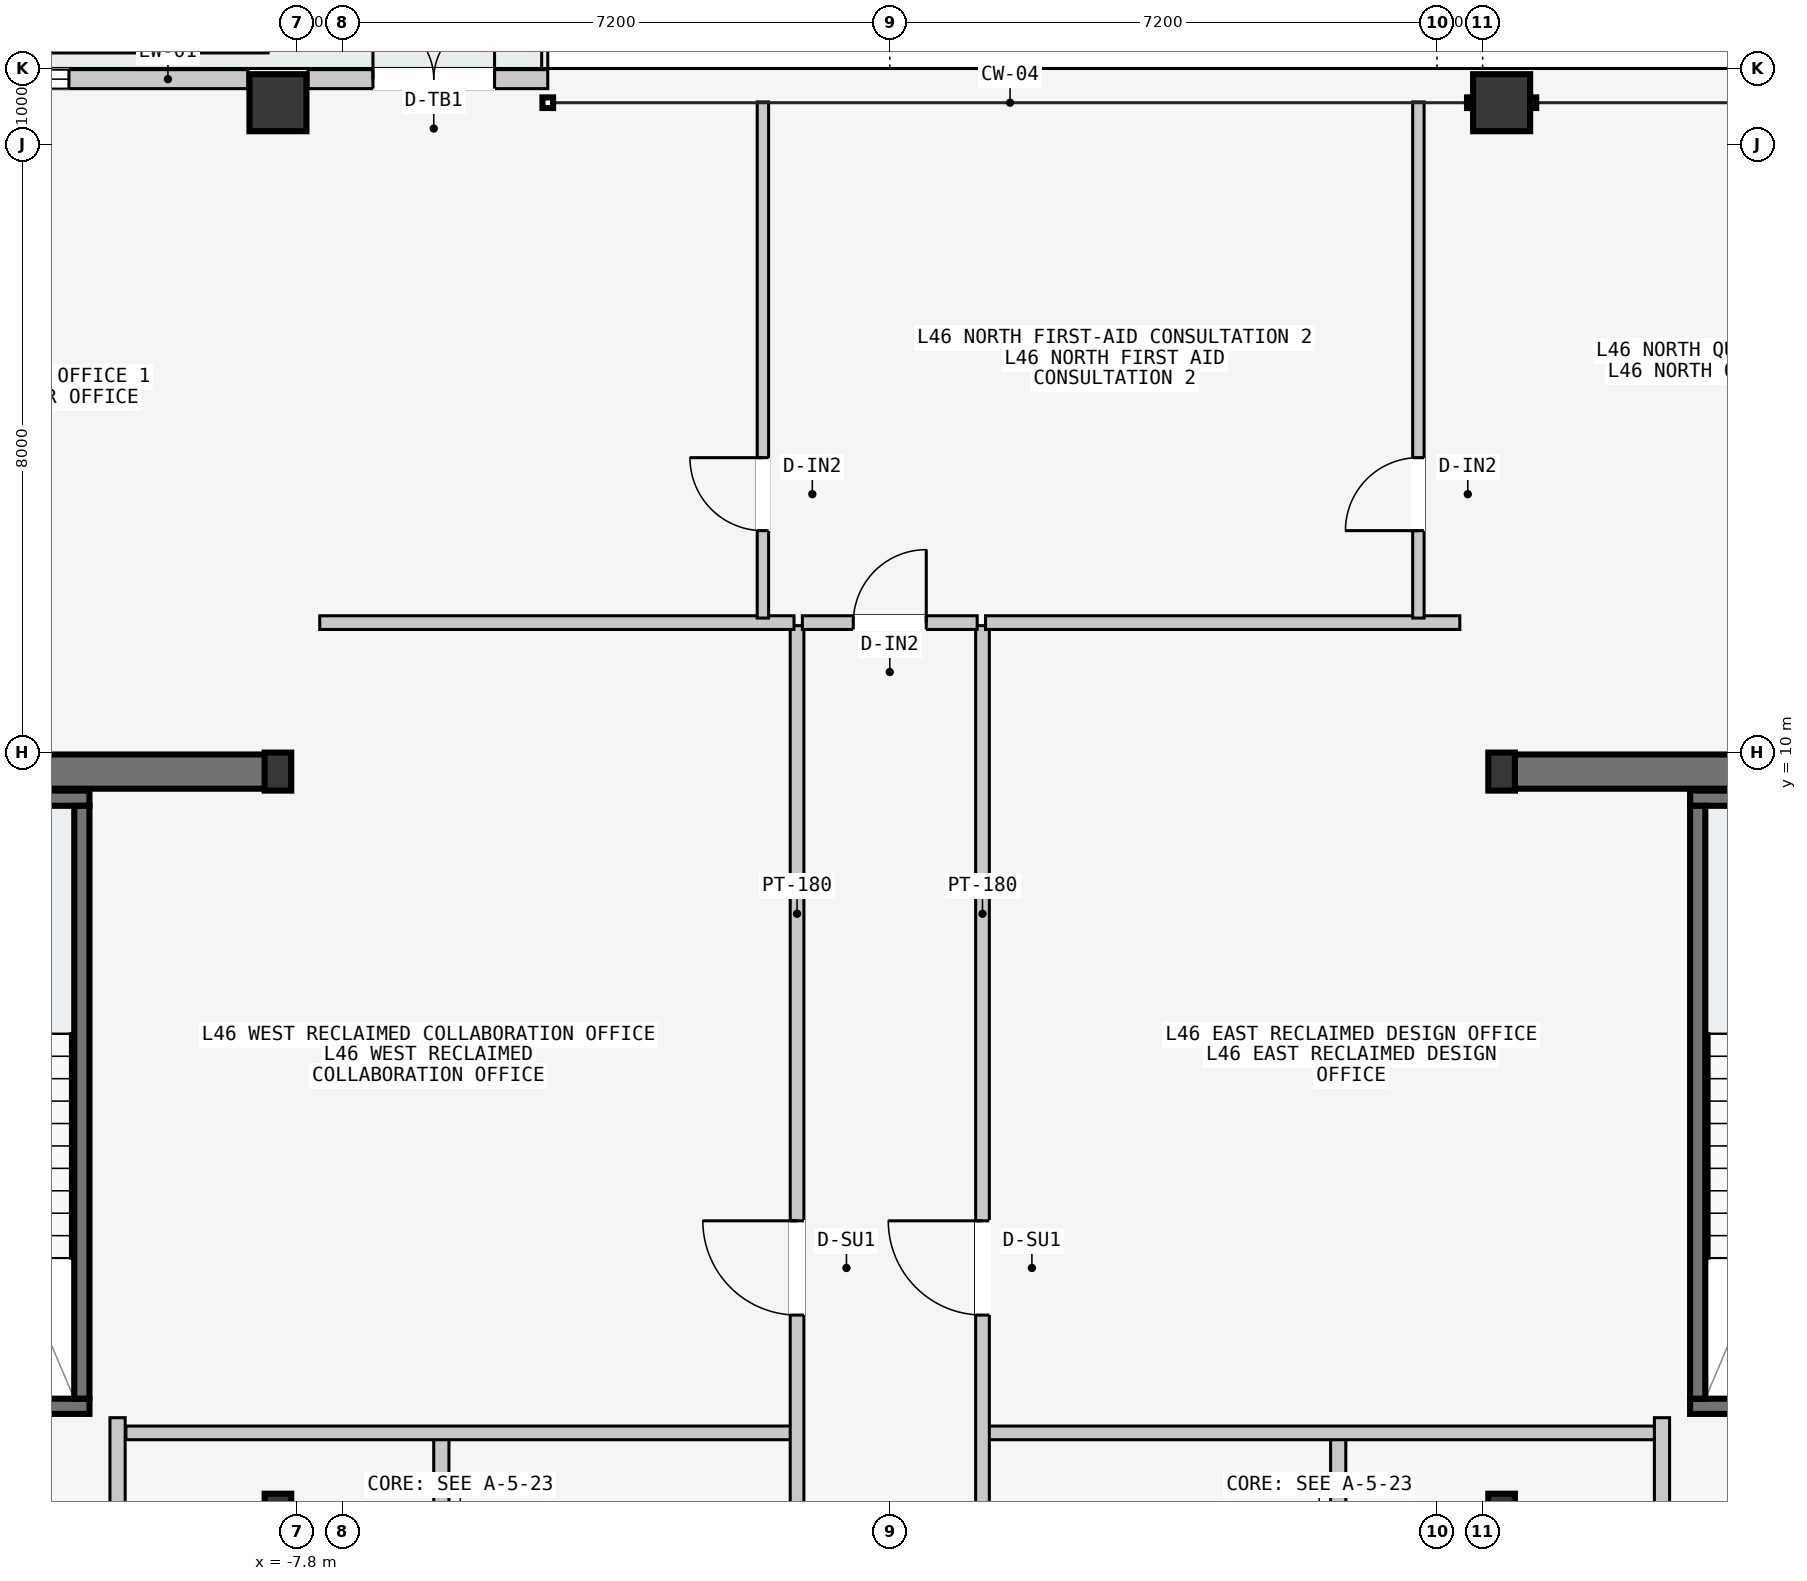
"""IFC4 building model, lengths in metres.
Left out: names, types, materials, properties, quantities, classifications, styles, units other than length and angle.
Written with IfcOpenShell. Run it as: python <this file> out.ifc"""

import sys

from ifc_helpers import new_model, si_unit, direction, frame, frame_2d, origin, origin_2d, place, context, subcontext, project, spatial, rectangle, hollow_rectangle, i_section, extrude, element, fill, save


model = new_model("IFC4")
c1 = context("Model", 3, precision=1e-05, world=origin(), true_north=direction((0.0, 1.0)))
c2 = subcontext(c1, "Body", "Model", "MODEL_VIEW")
j1 = project(units=[si_unit("LENGTHUNIT", "METRE"), si_unit("PLANEANGLEUNIT", "RADIAN")], contexts=[c1])
p1 = place(None, origin())
s1 = spatial("IfcSite", under=j1, at=p1, CompositionType="ELEMENT")
p2 = place(p1, origin())
s2 = spatial("IfcBuilding", under=s1, at=p2, CompositionType="ELEMENT")
p3 = place(p2, frame((0.0, 0.0, 176.7)))
s3 = spatial("IfcBuildingStorey", under=s2, at=p3, CompositionType="ELEMENT", Elevation=176.7)
for number, where, z_axis, x_axis in (
    (1, (-14.53, 9.75, -0.2), (0.0, 0.0, 1.0), (1.0, 0.0, 0.0)),
    (2, (8.07, 9.75, -0.2), (0.0, 0.0, 1.0), (1.0, 0.0, 0.0)),
):
    element("IfcWall", number, at=place(p3, frame(where, z_axis=z_axis, x_axis=x_axis)), inside=s3, PredefinedType="SHEAR", context=c2, shape_type="SweptSolid", body=[
        extrude(rectangle(XDim=6.46, YDim=0.45, at=frame_2d((3.23, 0.0))), origin(), (0.0, 0.0, 1.0), 3.6),
    ])
p4 = place(p3, frame((-14.25, 1.4, -0.2), z_axis=(0.0, 0.0, 1.0), x_axis=(1.0, 0.0, 0.0)))
e3 = element("IfcWall", 3, at=p4, inside=s3, PredefinedType="SOLIDWALL", context=c2, shape_type="SweptSolid", body=[
    extrude(rectangle(XDim=3.72, YDim=0.2, at=frame_2d((1.86, 0.0))), origin(), (0.0, 0.0, 1.0), 3.6),
])
p5 = place(p4, frame((1.5, 0.0, 0.2)))
e4 = element("IfcOpeningElement", 4, at=p5, cuts=e3, PredefinedType="OPENING", context=c2, shape_type="SweptSolid", body=[
    extrude(rectangle(XDim=1.12, YDim=2.18, at=frame_2d((0.56, 1.09))), frame((0.0, 0.11, 0.0), z_axis=(0.0, -1.0, 0.0), x_axis=(1.0, 0.0, 0.0)), (0.0, 0.0, 1.0), 0.22),
])
p6 = place(p3, frame((-14.25, 9.4, -0.2), z_axis=(0.0, 0.0, 1.0), x_axis=(1.0, 0.0, 0.0)))
e5 = element("IfcWall", 5, at=p6, inside=s3, PredefinedType="SOLIDWALL", context=c2, shape_type="SweptSolid", body=[
    extrude(rectangle(XDim=3.72, YDim=0.2, at=frame_2d((1.86, 0.0))), origin(), (0.0, 0.0, 1.0), 3.6),
])
p7 = place(p3, frame((-10.63, 1.5, -0.2), z_axis=(0.0, 0.0, 1.0), x_axis=(0.0, 1.0, 0.0)))
e6 = element("IfcWall", 6, at=p7, inside=s3, PredefinedType="SOLIDWALL", context=c2, shape_type="SweptSolid", body=[
    extrude(rectangle(XDim=7.8, YDim=0.2, at=frame_2d((3.9, 0.0))), origin(), (0.0, 0.0, 1.0), 3.6),
])
p8 = place(p3, frame((10.53, 1.4, -0.2), z_axis=(0.0, 0.0, 1.0), x_axis=(1.0, 0.0, 0.0)))
e7 = element("IfcWall", 7, at=p8, inside=s3, PredefinedType="SOLIDWALL", context=c2, shape_type="SweptSolid", body=[
    extrude(rectangle(XDim=3.72, YDim=0.2, at=frame_2d((1.86, 0.0))), origin(), (0.0, 0.0, 1.0), 3.6),
])
p9 = place(p8, frame((1.5, 0.0, 0.2)))
e8 = element("IfcOpeningElement", 8, at=p9, cuts=e7, PredefinedType="OPENING", context=c2, shape_type="SweptSolid", body=[
    extrude(rectangle(XDim=1.12, YDim=2.18, at=frame_2d((0.56, 1.09))), frame((0.0, 0.11, 0.0), z_axis=(0.0, -1.0, 0.0), x_axis=(1.0, 0.0, 0.0)), (0.0, 0.0, 1.0), 0.22),
])
p10 = place(p3, frame((10.53, 9.4, -0.2), z_axis=(0.0, 0.0, 1.0), x_axis=(1.0, 0.0, 0.0)))
e9 = element("IfcWall", 9, at=p10, inside=s3, PredefinedType="SOLIDWALL", context=c2, shape_type="SweptSolid", body=[
    extrude(rectangle(XDim=3.72, YDim=0.2, at=frame_2d((1.86, 0.0))), origin(), (0.0, 0.0, 1.0), 3.6),
])
p11 = place(p3, frame((10.63, 1.5, -0.2), z_axis=(0.0, 0.0, 1.0), x_axis=(0.0, 1.0, 0.0)))
e10 = element("IfcWall", 10, at=p11, inside=s3, PredefinedType="SOLIDWALL", context=c2, shape_type="SweptSolid", body=[
    extrude(rectangle(XDim=7.8, YDim=0.2, at=frame_2d((3.9, 0.0))), origin(), (0.0, 0.0, 1.0), 3.6),
])
for number, where, z_axis, x_axis in (
    (11, (-8.05, 0.0, 0.0), (0.0, 0.0, 1.0), (1.0, 0.0, 0.0)),
    (12, (-8.05, 9.75, 0.0), (0.0, 0.0, 1.0), (1.0, 0.0, 0.0)),
    (13, (8.05, 0.0, 0.0), (0.0, 0.0, 1.0), (1.0, 0.0, 0.0)),
    (14, (8.05, 9.75, 0.0), (0.0, 0.0, 1.0), (1.0, 0.0, 0.0)),
):
    element("IfcColumn", number, at=place(p3, frame(where, z_axis=z_axis, x_axis=x_axis)), inside=s3, PredefinedType="COLUMN", context=c2, shape_type="SweptSolid", body=[
        extrude(i_section(OverallWidth=0.35, OverallDepth=0.5, WebThickness=0.02, FlangeThickness=0.032, at=origin_2d()), origin(), (0.0, 0.0, 1.0), 3.6),
    ])
for number, where, z_axis, x_axis in (
    (15, (-8.05, 18.55, 0.0), (0.0, 0.0, 1.0), (1.0, 0.0, 0.0)),
    (16, (8.05, 18.55, 0.0), (0.0, 0.0, 1.0), (1.0, 0.0, 0.0)),
):
    element("IfcColumn", number, at=place(p3, frame(where, z_axis=z_axis, x_axis=x_axis)), inside=s3, PredefinedType="COLUMN", context=c2, shape_type="SweptSolid", body=[
        extrude(hollow_rectangle(XDim=0.75, YDim=0.75, WallThickness=0.032, at=origin_2d()), origin(), (0.0, 0.0, 1.0), 3.6),
    ])
p12 = place(p3, frame((-14.655, 18.86, 0.0), z_axis=(0.0, 0.0, 1.0), x_axis=(1.0, 0.0, 0.0)))
e17 = element("IfcWall", 17, at=p12, inside=s3, PredefinedType="STANDARD", context=c2, shape_type="SweptSolid", body=[
    extrude(rectangle(XDim=6.21, YDim=0.25, at=frame_2d((3.105, 0.0))), origin(), (0.0, 0.0, 1.0), 3.4),
])
p13 = place(p12, frame((1.855, 0.0, 0.85)))
e18 = element("IfcOpeningElement", 18, at=p13, cuts=e17, PredefinedType="OPENING", context=c2, shape_type="SweptSolid", body=[
    extrude(rectangle(XDim=2.0, YDim=2.1, at=frame_2d((1.0, 1.05))), frame((0.0, 0.135, 0.0), z_axis=(0.0, -1.0, 0.0), x_axis=(1.0, 0.0, 0.0)), (0.0, 0.0, 1.0), 0.27),
])
p14 = place(p3, frame((-7.655, 18.86, 0.0), z_axis=(0.0, 0.0, 1.0), x_axis=(1.0, 0.0, 0.0)))
e19 = element("IfcWall", 19, at=p14, inside=s3, PredefinedType="STANDARD", context=c2, shape_type="SweptSolid", body=[
    extrude(rectangle(XDim=3.155, YDim=0.25, at=frame_2d((1.578, 0.0))), origin(), (0.0, 0.0, 1.0), 3.4),
])
p15 = place(p14, frame((0.855, 0.0, 0.0)))
e20 = element("IfcOpeningElement", 20, at=p15, cuts=e19, PredefinedType="OPENING", context=c2, shape_type="SweptSolid", body=[
    extrude(rectangle(XDim=1.6, YDim=2.2, at=frame_2d((0.8, 1.1))), frame((0.0, 0.135, 0.0), z_axis=(0.0, -1.0, 0.0), x_axis=(1.0, 0.0, 0.0)), (0.0, 0.0, 1.0), 0.27),
])
p16 = place(p3, frame((-5.9, -9.45, 0.0), z_axis=(0.0, 0.0, 1.0), x_axis=(0.0, 1.0, 0.0)))
e21 = element("IfcWall", 21, at=p16, inside=s3, PredefinedType="PARTITIONING", context=c2, shape_type="SweptSolid", body=[
    extrude(rectangle(XDim=10.5, YDim=0.2, at=frame_2d((5.25, 0.0))), origin(), (0.0, 0.0, 1.0), 3.4),
])
p17 = place(p16, frame((3.9, 0.0, 0.0)))
e22 = element("IfcOpeningElement", 22, at=p17, cuts=e21, PredefinedType="OPENING", context=c2, shape_type="SweptSolid", body=[
    extrude(rectangle(XDim=1.5, YDim=2.2, at=frame_2d((0.75, 1.1))), frame((0.0, 0.11, 0.0), z_axis=(0.0, -1.0, 0.0), x_axis=(1.0, 0.0, 0.0)), (0.0, 0.0, 1.0), 0.22),
])
p18 = place(p3, frame((-10.16, -2.55, 0.0), z_axis=(0.0, 0.0, 1.0), x_axis=(0.0, 1.0, 0.0)))
e23 = element("IfcWall", 23, at=p18, inside=s3, PredefinedType="PARTITIONING", context=c2, shape_type="SweptSolid", body=[
    extrude(rectangle(XDim=3.8, YDim=0.2, at=frame_2d((1.9, 0.0))), origin(), (0.0, 0.0, 1.0), 3.4),
])
p19 = place(p18, frame((1.3, 0.0, 0.0)))
e24 = element("IfcOpeningElement", 24, at=p19, cuts=e23, PredefinedType="OPENING", context=c2, shape_type="SweptSolid", body=[
    extrude(rectangle(XDim=1.1, YDim=2.15, at=frame_2d((0.55, 1.075))), frame((0.0, 0.11, 0.0), z_axis=(0.0, -1.0, 0.0), x_axis=(1.0, 0.0, 0.0)), (0.0, 0.0, 1.0), 0.22),
])
p20 = place(p3, frame((5.9, -9.45, 0.0), z_axis=(0.0, 0.0, 1.0), x_axis=(0.0, 1.0, 0.0)))
e25 = element("IfcWall", 25, at=p20, inside=s3, PredefinedType="PARTITIONING", context=c2, shape_type="SweptSolid", body=[
    extrude(rectangle(XDim=10.5, YDim=0.2, at=frame_2d((5.25, 0.0))), origin(), (0.0, 0.0, 1.0), 3.4),
])
p21 = place(p20, frame((3.9, 0.0, 0.0)))
e26 = element("IfcOpeningElement", 26, at=p21, cuts=e25, PredefinedType="OPENING", context=c2, shape_type="SweptSolid", body=[
    extrude(rectangle(XDim=1.5, YDim=2.2, at=frame_2d((0.75, 1.1))), frame((0.0, 0.11, 0.0), z_axis=(0.0, -1.0, 0.0), x_axis=(1.0, 0.0, 0.0)), (0.0, 0.0, 1.0), 0.22),
])
p22 = place(p3, frame((10.16, -2.55, 0.0), z_axis=(0.0, 0.0, 1.0), x_axis=(0.0, 1.0, 0.0)))
e27 = element("IfcWall", 27, at=p22, inside=s3, PredefinedType="PARTITIONING", context=c2, shape_type="SweptSolid", body=[
    extrude(rectangle(XDim=3.8, YDim=0.2, at=frame_2d((1.9, 0.0))), origin(), (0.0, 0.0, 1.0), 3.4),
])
p23 = place(p22, frame((1.3, 0.0, 0.0)))
e28 = element("IfcOpeningElement", 28, at=p23, cuts=e27, PredefinedType="OPENING", context=c2, shape_type="SweptSolid", body=[
    extrude(rectangle(XDim=1.1, YDim=2.15, at=frame_2d((0.55, 1.075))), frame((0.0, 0.11, 0.0), z_axis=(0.0, -1.0, 0.0), x_axis=(1.0, 0.0, 0.0)), (0.0, 0.0, 1.0), 0.22),
])
p24 = place(p3, frame((-10.05, 1.05, 0.0), z_axis=(0.0, 0.0, 1.0), x_axis=(1.0, 0.0, 0.0)))
e29 = element("IfcWall", 29, at=p24, inside=s3, PredefinedType="PARTITIONING", context=c2, shape_type="SweptSolid", body=[
    extrude(rectangle(XDim=8.79, YDim=0.18, at=frame_2d((4.395, 0.0))), origin(), (0.0, 0.0, 1.0), 3.4),
])
p25 = place(p3, frame((-1.22, -3.5, 0.0), z_axis=(0.0, 0.0, 1.0), x_axis=(0.0, 1.0, 0.0)))
e30 = element("IfcWall", 30, at=p25, inside=s3, PredefinedType="PARTITIONING", context=c2, shape_type="SweptSolid", body=[
    extrude(rectangle(XDim=15.17, YDim=0.18, at=frame_2d((7.585, 0.0))), origin(), (0.0, 0.0, 1.0), 3.4),
])
p26 = place(p25, frame((6.1, 0.0, 0.0)))
e31 = element("IfcOpeningElement", 31, at=p26, cuts=e30, PredefinedType="OPENING", context=c2, shape_type="SweptSolid", body=[
    extrude(rectangle(XDim=1.24, YDim=2.24, at=frame_2d((0.62, 1.12))), frame((0.0, 0.1, 0.0), z_axis=(0.0, -1.0, 0.0), x_axis=(1.0, 0.0, 0.0)), (0.0, 0.0, 1.0), 0.2),
])
p27 = place(p25, frame((1.6, 0.0, 0.0)))
e32 = element("IfcOpeningElement", 32, at=p27, cuts=e30, PredefinedType="OPENING", context=c2, shape_type="SweptSolid", body=[
    extrude(rectangle(XDim=0.96, YDim=2.18, at=frame_2d((0.48, 1.09))), frame((0.0, 0.1, 0.0), z_axis=(0.0, -1.0, 0.0), x_axis=(1.0, 0.0, 0.0)), (0.0, 0.0, 1.0), 0.2),
])
p28 = place(p3, frame((-7.5, 11.71, 0.0), z_axis=(0.0, 0.0, 1.0), x_axis=(1.0, 0.0, 0.0)))
e33 = element("IfcWall", 33, at=p28, inside=s3, PredefinedType="PARTITIONING", context=c2, shape_type="SweptSolid", body=[
    extrude(rectangle(XDim=6.24, YDim=0.18, at=frame_2d((3.12, 0.0))), origin(), (0.0, 0.0, 1.0), 3.4),
])
p29 = place(p3, frame((1.26, 1.05, 0.0), z_axis=(0.0, 0.0, 1.0), x_axis=(1.0, 0.0, 0.0)))
e34 = element("IfcWall", 34, at=p29, inside=s3, PredefinedType="PARTITIONING", context=c2, shape_type="SweptSolid", body=[
    extrude(rectangle(XDim=8.8, YDim=0.18, at=frame_2d((4.4, 0.0))), origin(), (0.0, 0.0, 1.0), 3.4),
])
p30 = place(p3, frame((1.22, -3.5, 0.0), z_axis=(0.0, 0.0, 1.0), x_axis=(0.0, 1.0, 0.0)))
e35 = element("IfcWall", 35, at=p30, inside=s3, PredefinedType="PARTITIONING", context=c2, shape_type="SweptSolid", body=[
    extrude(rectangle(XDim=15.17, YDim=0.18, at=frame_2d((7.585, 0.0))), origin(), (0.0, 0.0, 1.0), 3.4),
])
p31 = place(p30, frame((6.1, 0.0, 0.0)))
e36 = element("IfcOpeningElement", 36, at=p31, cuts=e35, PredefinedType="OPENING", context=c2, shape_type="SweptSolid", body=[
    extrude(rectangle(XDim=1.24, YDim=2.24, at=frame_2d((0.62, 1.12))), frame((0.0, 0.1, 0.0), z_axis=(0.0, -1.0, 0.0), x_axis=(1.0, 0.0, 0.0)), (0.0, 0.0, 1.0), 0.2),
])
p32 = place(p30, frame((1.6, 0.0, 0.0)))
e37 = element("IfcOpeningElement", 37, at=p32, cuts=e35, PredefinedType="OPENING", context=c2, shape_type="SweptSolid", body=[
    extrude(rectangle(XDim=0.96, YDim=2.18, at=frame_2d((0.48, 1.09))), frame((0.0, 0.1, 0.0), z_axis=(0.0, -1.0, 0.0), x_axis=(1.0, 0.0, 0.0)), (0.0, 0.0, 1.0), 0.2),
])
p33 = place(p3, frame((1.26, 11.71, 0.0), z_axis=(0.0, 0.0, 1.0), x_axis=(1.0, 0.0, 0.0)))
e38 = element("IfcWall", 38, at=p33, inside=s3, PredefinedType="PARTITIONING", context=c2, shape_type="SweptSolid", body=[
    extrude(rectangle(XDim=6.24, YDim=0.18, at=frame_2d((3.12, 0.0))), origin(), (0.0, 0.0, 1.0), 3.4),
])
p34 = place(p3, frame((-1.669, 11.77, 0.0), z_axis=(0.0, 0.0, 1.0), x_axis=(0.0, 1.0, 0.0)))
e39 = element("IfcWall", 39, at=p34, inside=s3, PredefinedType="PARTITIONING", context=c2, shape_type="SweptSolid", body=[
    extrude(rectangle(XDim=6.79, YDim=0.15, at=frame_2d((3.395, 0.0))), origin(), (0.0, 0.0, 1.0), 3.4),
])
p35 = place(p34, frame((1.15, 0.0, 0.0)))
e40 = element("IfcOpeningElement", 40, at=p35, cuts=e39, PredefinedType="OPENING", context=c2, shape_type="SweptSolid", body=[
    extrude(rectangle(XDim=0.96, YDim=2.18, at=frame_2d((0.48, 1.09))), frame((0.0, 0.085, 0.0), z_axis=(0.0, -1.0, 0.0), x_axis=(1.0, 0.0, 0.0)), (0.0, 0.0, 1.0), 0.17),
])
p36 = place(p3, frame((6.955, 11.77, 0.0), z_axis=(0.0, 0.0, 1.0), x_axis=(0.0, 1.0, 0.0)))
e41 = element("IfcWall", 41, at=p36, inside=s3, PredefinedType="PARTITIONING", context=c2, shape_type="SweptSolid", body=[
    extrude(rectangle(XDim=6.79, YDim=0.15, at=frame_2d((3.395, 0.0))), origin(), (0.0, 0.0, 1.0), 3.4),
])
p37 = place(p36, frame((1.15, 0.0, 0.0)))
e42 = element("IfcOpeningElement", 42, at=p37, cuts=e41, PredefinedType="OPENING", context=c2, shape_type="SweptSolid", body=[
    extrude(rectangle(XDim=0.96, YDim=2.18, at=frame_2d((0.48, 1.09))), frame((0.0, 0.085, 0.0), z_axis=(0.0, -1.0, 0.0), x_axis=(1.0, 0.0, 0.0)), (0.0, 0.0, 1.0), 0.17),
])
p38 = place(p3, frame((-1.15, 11.71, 0.0), z_axis=(0.0, 0.0, 1.0), x_axis=(1.0, 0.0, 0.0)))
e43 = element("IfcWall", 43, at=p38, inside=s3, PredefinedType="PARTITIONING", context=c2, shape_type="SweptSolid", body=[
    extrude(rectangle(XDim=2.3, YDim=0.18, at=frame_2d((1.15, 0.0))), origin(), (0.0, 0.0, 1.0), 3.4),
])
p39 = place(p38, frame((0.67, 0.0, 0.0)))
e44 = element("IfcOpeningElement", 44, at=p39, cuts=e43, PredefinedType="OPENING", context=c2, shape_type="SweptSolid", body=[
    extrude(rectangle(XDim=0.96, YDim=2.18, at=frame_2d((0.48, 1.09))), frame((0.0, 0.1, 0.0), z_axis=(0.0, -1.0, 0.0), x_axis=(1.0, 0.0, 0.0)), (0.0, 0.0, 1.0), 0.2),
])
p40 = place(p13, origin())
e45 = element("IfcWindow", 45, at=p40, inside=s3, PartitioningType="SINGLE_PANEL", PredefinedType="WINDOW", context=c2, shape_type="SweptSolid", body=[
    extrude(rectangle(XDim=2.0, YDim=2.1, at=frame_2d((1.0, 1.05))), frame((0.0, 0.03, 0.0), z_axis=(0.0, -1.0, 0.0), x_axis=(1.0, 0.0, 0.0)), (0.0, 0.0, 1.0), 0.06),
])
fill(e18, e45)
p41 = place(p15, origin())
e46 = element("IfcDoor", 46, at=p41, inside=s3, OperationType="DOUBLE_DOOR_SINGLE_SWING", PredefinedType="DOOR", context=c2, shape_type="SweptSolid", body=[
    extrude(rectangle(XDim=1.6, YDim=2.2, at=frame_2d((0.8, 1.1))), frame((0.0, 0.025, 0.0), z_axis=(0.0, -1.0, 0.0), x_axis=(1.0, 0.0, 0.0)), (0.0, 0.0, 1.0), 0.05),
])
fill(e20, e46)
p42 = place(p26, origin())
e47 = element("IfcDoor", 47, at=p42, inside=s3, OperationType="SINGLE_SWING_RIGHT", PredefinedType="DOOR", context=c2, shape_type="SweptSolid", body=[
    extrude(rectangle(XDim=1.24, YDim=2.24, at=frame_2d((0.62, 1.12))), frame((0.0, 0.025, 0.0), z_axis=(0.0, -1.0, 0.0), x_axis=(1.0, 0.0, 0.0)), (0.0, 0.0, 1.0), 0.05),
])
fill(e31, e47)
p43 = place(p31, origin())
e48 = element("IfcDoor", 48, at=p43, inside=s3, OperationType="SINGLE_SWING_RIGHT", PredefinedType="DOOR", context=c2, shape_type="SweptSolid", body=[
    extrude(rectangle(XDim=1.24, YDim=2.24, at=frame_2d((0.62, 1.12))), frame((0.0, 0.025, 0.0), z_axis=(0.0, -1.0, 0.0), x_axis=(1.0, 0.0, 0.0)), (0.0, 0.0, 1.0), 0.05),
])
fill(e36, e48)
p44 = place(p35, origin())
e49 = element("IfcDoor", 49, at=p44, inside=s3, OperationType="SINGLE_SWING_RIGHT", PredefinedType="DOOR", context=c2, shape_type="SweptSolid", body=[
    extrude(rectangle(XDim=0.96, YDim=2.18, at=frame_2d((0.48, 1.09))), frame((0.0, 0.025, 0.0), z_axis=(0.0, -1.0, 0.0), x_axis=(1.0, 0.0, 0.0)), (0.0, 0.0, 1.0), 0.05),
])
fill(e40, e49)
p45 = place(p37, origin())
e50 = element("IfcDoor", 50, at=p45, inside=s3, OperationType="SINGLE_SWING_LEFT", PredefinedType="DOOR", context=c2, shape_type="SweptSolid", body=[
    extrude(rectangle(XDim=0.96, YDim=2.18, at=frame_2d((0.48, 1.09))), frame((0.0, 0.025, 0.0), z_axis=(0.0, -1.0, 0.0), x_axis=(1.0, 0.0, 0.0)), (0.0, 0.0, 1.0), 0.05),
])
fill(e42, e50)
p46 = place(p39, origin())
e51 = element("IfcDoor", 51, at=p46, inside=s3, OperationType="SINGLE_SWING_RIGHT", PredefinedType="DOOR", context=c2, shape_type="SweptSolid", body=[
    extrude(rectangle(XDim=0.96, YDim=2.18, at=frame_2d((0.48, 1.09))), frame((0.0, 0.025, 0.0), z_axis=(0.0, -1.0, 0.0), x_axis=(1.0, 0.0, 0.0)), (0.0, 0.0, 1.0), 0.05),
])
fill(e44, e51)
save(model, sys.argv[1])
